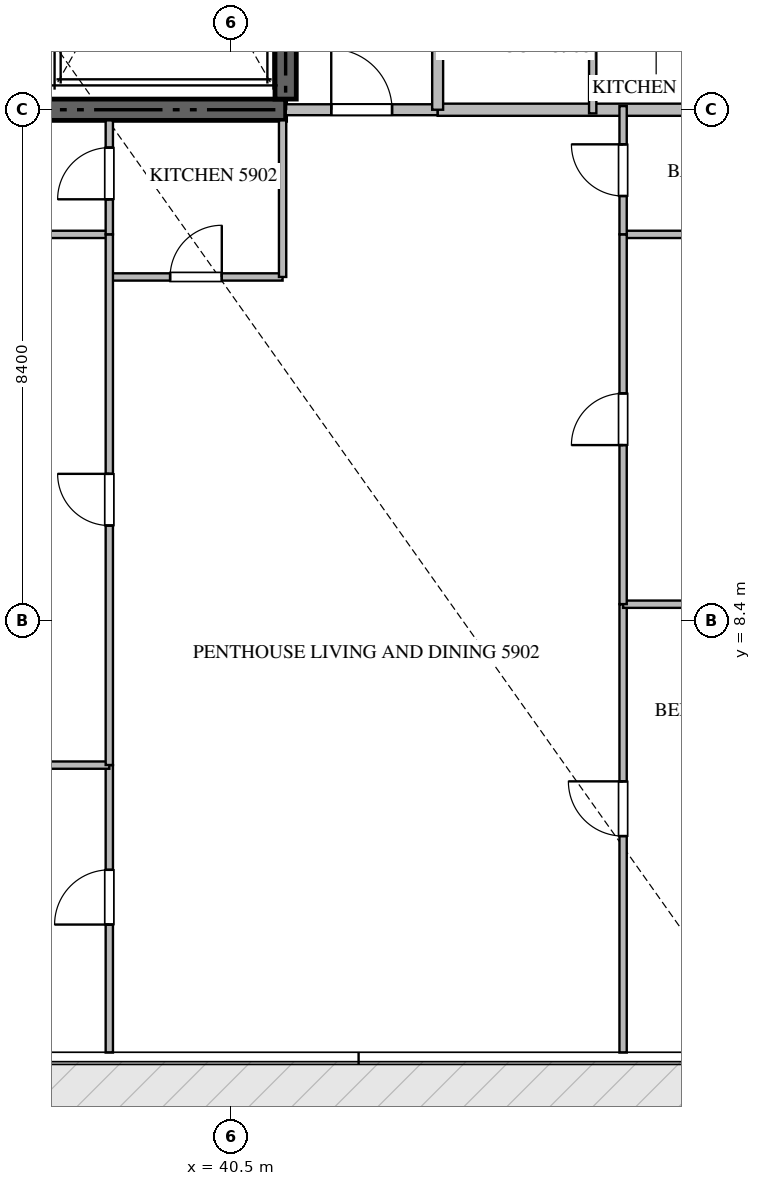
"""IFC4 building model, lengths in metres.
Left out: names, types, materials, properties, quantities, classifications, styles, units other than length and angle.
Written with IfcOpenShell. Run it as: python <this file> out.ifc"""

import sys

from ifc_helpers import new_model, si_unit, direction, frame, frame_2d, origin, place, context, subcontext, project, spatial, rectangle, extrude, source, transform, mapped, element, fill, save


model = new_model("IFC4")
c1 = context("Model", 3, precision=1e-05, world=origin(), true_north=direction((0.0, 1.0)))
c2 = subcontext(c1, "Body", "Model", "MODEL_VIEW")
j1 = project(units=[si_unit("LENGTHUNIT", "METRE"), si_unit("PLANEANGLEUNIT", "RADIAN")], contexts=[c1])
p1 = place(None, origin())
s1 = spatial("IfcSite", under=j1, at=p1, CompositionType="ELEMENT")
p2 = place(p1, origin())
s2 = spatial("IfcBuilding", under=s1, at=p2, CompositionType="ELEMENT")
p3 = place(p2, frame((0.0, 0.0, 237.4)))
s3 = spatial("IfcBuildingStorey", under=s2, at=p3, CompositionType="ELEMENT", Elevation=237.4)
p4 = place(p3, frame((23.4, 16.8, -0.26), z_axis=(0.0, 0.0, 1.0), x_axis=(1.0, 0.0, 0.0)))
e1 = element("IfcWall", 1, at=p4, inside=s3, PredefinedType="SHEAR", context=c2, shape_type="SweptSolid", body=[
    extrude(rectangle(XDim=18.0, YDim=0.35, at=frame_2d((9.0, 0.0))), origin(), (0.0, 0.0, 1.0), 3.848),
])
p5 = place(p3, frame((41.4, 16.975, -0.26), z_axis=(0.0, 0.0, 1.0), x_axis=(0.0, 1.0, 0.0)))
e2 = element("IfcWall", 2, at=p5, inside=s3, PredefinedType="SHEAR", context=c2, shape_type="SweptSolid", body=[
    extrude(rectangle(XDim=8.375, YDim=0.35, at=frame_2d((4.188, 0.0))), origin(), (0.0, 0.0, 1.0), 3.848),
])
p6 = place(p3, frame((43.9, 16.8, 0.0), z_axis=(0.0, 0.0, 1.0), x_axis=(1.0, 0.0, 0.0)))
e3 = element("IfcWall", 3, at=p6, inside=s3, PredefinedType="PARTITIONING", context=c2, shape_type="SweptSolid", body=[
    extrude(rectangle(XDim=13.418, YDim=0.2, at=frame_2d((6.709, 0.0))), origin(), (0.0, 0.0, 1.0), 3.59),
])
p7 = place(p3, frame((41.402, 16.8, 0.0), z_axis=(0.0, 0.0, 1.0), x_axis=(1.0, 0.0, 0.0)))
e4 = element("IfcWall", 4, at=p7, inside=s3, PredefinedType="PARTITIONING", context=c2, shape_type="SweptSolid", body=[
    extrude(rectangle(XDim=2.496, YDim=0.18, at=frame_2d((1.248, 0.0))), origin(), (0.0, 0.0, 1.0), 3.59),
])
p8 = place(p7, frame((0.748, 0.0, 0.0)))
e5 = element("IfcOpeningElement", 5, at=p8, cuts=e4, PredefinedType="OPENING", context=c2, shape_type="SweptSolid", body=[
    extrude(rectangle(XDim=1.0, YDim=2.15, at=frame_2d((0.5, 1.075))), frame((0.0, 0.1, 0.0), z_axis=(0.0, -1.0, 0.0), x_axis=(1.0, 0.0, 0.0)), (0.0, 0.0, 1.0), 0.2),
])
p9 = place(p3, frame((43.9, 16.8, 0.0), z_axis=(0.0, 0.0, 1.0), x_axis=(0.0, 1.0, 0.0)))
e6 = element("IfcWall", 6, at=p9, inside=s3, PredefinedType="PARTITIONING", context=c2, shape_type="SweptSolid", body=[
    extrude(rectangle(XDim=16.8, YDim=0.18, at=frame_2d((8.4, 0.0))), origin(), (0.0, 0.0, 1.0), 3.59),
])
p10 = place(p9, frame((4.693, 0.0, 0.0)))
e7 = element("IfcOpeningElement", 7, at=p10, cuts=e6, PredefinedType="OPENING", context=c2, shape_type="SweptSolid", body=[
    extrude(rectangle(XDim=1.0, YDim=2.15, at=frame_2d((0.5, 1.075))), frame((0.0, 0.1, 0.0), z_axis=(0.0, -1.0, 0.0), x_axis=(1.0, 0.0, 0.0)), (0.0, 0.0, 1.0), 0.2),
])
p11 = place(p9, frame((13.13, 0.0, 0.0)))
e8 = element("IfcOpeningElement", 8, at=p11, cuts=e6, PredefinedType="OPENING", context=c2, shape_type="SweptSolid", body=[
    extrude(rectangle(XDim=1.0, YDim=2.15, at=frame_2d((0.5, 1.075))), frame((0.0, 0.1, 0.0), z_axis=(0.0, -1.0, 0.0), x_axis=(1.0, 0.0, 0.0)), (0.0, 0.0, 1.0), 0.2),
])
p12 = place(p3, frame((38.5, 14.05, 0.0), z_axis=(0.0, 0.0, 1.0), x_axis=(1.0, 0.0, 0.0)))
e9 = element("IfcWall", 9, at=p12, inside=s3, PredefinedType="PARTITIONING", context=c2, shape_type="SweptSolid", body=[
    extrude(rectangle(XDim=2.85, YDim=0.12, at=frame_2d((1.425, 0.0))), origin(), (0.0, 0.0, 1.0), 3.59),
])
p13 = place(p12, frame((1.0, 0.0, 0.0)))
e10 = element("IfcOpeningElement", 10, at=p13, cuts=e9, PredefinedType="OPENING", context=c2, shape_type="SweptSolid", body=[
    extrude(rectangle(XDim=0.85, YDim=2.1, at=frame_2d((0.425, 1.05))), frame((0.0, 0.07, 0.0), z_axis=(0.0, -1.0, 0.0), x_axis=(1.0, 0.0, 0.0)), (0.0, 0.0, 1.0), 0.14),
])
p14 = place(p3, frame((41.35, 14.05, 0.0), z_axis=(0.0, 0.0, 1.0), x_axis=(0.0, 1.0, 0.0)))
e11 = element("IfcWall", 11, at=p14, inside=s3, PredefinedType="PARTITIONING", context=c2, shape_type="SweptSolid", body=[
    extrude(rectangle(XDim=2.575, YDim=0.12, at=frame_2d((1.288, 0.0))), origin(), (0.0, 0.0, 1.0), 3.59),
])
p15 = place(p3, frame((38.5, 1.295, 0.0), z_axis=(0.0, 0.0, 1.0), x_axis=(0.0, 1.0, 0.0)))
e12 = element("IfcWall", 12, at=p15, inside=s3, PredefinedType="PARTITIONING", context=c2, shape_type="SweptSolid", body=[
    extrude(rectangle(XDim=4.727, YDim=0.12, at=frame_2d((2.364, 0.0))), origin(), (0.0, 0.0, 1.0), 3.59),
])
p16 = place(p15, frame((2.105, 0.0, 0.0)))
e13 = element("IfcOpeningElement", 13, at=p16, cuts=e12, PredefinedType="OPENING", context=c2, shape_type="SweptSolid", body=[
    extrude(rectangle(XDim=0.9, YDim=2.1, at=frame_2d((0.45, 1.05))), frame((0.0, 0.07, 0.0), z_axis=(0.0, -1.0, 0.0), x_axis=(1.0, 0.0, 0.0)), (0.0, 0.0, 1.0), 0.14),
])
for number, where, z_axis, x_axis in (
    (14, (29.44, 6.022, 0.0), (0.0, 0.0, 1.0), (1.0, 0.0, 0.0)),
    (15, (29.44, 14.75, 0.0), (0.0, 0.0, 1.0), (1.0, 0.0, 0.0)),
):
    element("IfcWall", number, at=place(p3, frame(where, z_axis=z_axis, x_axis=x_axis)), inside=s3, PredefinedType="PARTITIONING", context=c2, shape_type="SweptSolid", body=[
        extrude(rectangle(XDim=9.06, YDim=0.12, at=frame_2d((4.53, 0.0))), origin(), (0.0, 0.0, 1.0), 3.59),
    ])
p17 = place(p3, frame((38.5, 6.024, 0.0), z_axis=(0.0, 0.0, 1.0), x_axis=(0.0, 1.0, 0.0)))
e16 = element("IfcWall", 16, at=p17, inside=s3, PredefinedType="PARTITIONING", context=c2, shape_type="SweptSolid", body=[
    extrude(rectangle(XDim=8.726, YDim=0.12, at=frame_2d((4.363, 0.0))), origin(), (0.0, 0.0, 1.0), 3.59),
])
p18 = place(p17, frame((3.938, 0.0, 0.0)))
e17 = element("IfcOpeningElement", 17, at=p18, cuts=e16, PredefinedType="OPENING", context=c2, shape_type="SweptSolid", body=[
    extrude(rectangle(XDim=0.85, YDim=2.1, at=frame_2d((0.425, 1.05))), frame((0.0, 0.07, 0.0), z_axis=(0.0, -1.0, 0.0), x_axis=(1.0, 0.0, 0.0)), (0.0, 0.0, 1.0), 0.14),
])
p19 = place(p3, frame((38.5, 14.752, 0.0), z_axis=(0.0, 0.0, 1.0), x_axis=(0.0, 1.0, 0.0)))
e18 = element("IfcWall", 18, at=p19, inside=s3, PredefinedType="PARTITIONING", context=c2, shape_type="SweptSolid", body=[
    extrude(rectangle(XDim=1.873, YDim=0.12, at=frame_2d((0.937, 0.0))), origin(), (0.0, 0.0, 1.0), 3.59),
])
p20 = place(p19, frame((0.575, 0.0, 0.0)))
e19 = element("IfcOpeningElement", 19, at=p20, cuts=e18, PredefinedType="OPENING", context=c2, shape_type="SweptSolid", body=[
    extrude(rectangle(XDim=0.85, YDim=2.1, at=frame_2d((0.425, 1.05))), frame((0.0, 0.07, 0.0), z_axis=(0.0, -1.0, 0.0), x_axis=(1.0, 0.0, 0.0)), (0.0, 0.0, 1.0), 0.14),
])
p21 = place(p3, frame((46.95, 1.295, 0.0), z_axis=(0.0, 0.0, 1.0), x_axis=(0.0, 1.0, 0.0)))
e20 = element("IfcWall", 20, at=p21, inside=s3, PredefinedType="PARTITIONING", context=c2, shape_type="SweptSolid", body=[
    extrude(rectangle(XDim=7.373, YDim=0.12, at=frame_2d((3.687, 0.0))), origin(), (0.0, 0.0, 1.0), 3.59),
])
p22 = place(p21, frame((3.56, 0.0, 0.0)))
e21 = element("IfcOpeningElement", 21, at=p22, cuts=e20, PredefinedType="OPENING", context=c2, shape_type="SweptSolid", body=[
    extrude(rectangle(XDim=0.9, YDim=2.1, at=frame_2d((0.45, 1.05))), frame((0.0, 0.07, 0.0), z_axis=(0.0, -1.0, 0.0), x_axis=(1.0, 0.0, 0.0)), (0.0, 0.0, 1.0), 0.14),
])
p23 = place(p3, frame((46.95, 8.668, 0.0), z_axis=(0.0, 0.0, 1.0), x_axis=(1.0, 0.0, 0.0)))
e22 = element("IfcWall", 22, at=p23, inside=s3, PredefinedType="PARTITIONING", context=c2, shape_type="SweptSolid", body=[
    extrude(rectangle(XDim=6.355, YDim=0.12, at=frame_2d((3.177, 0.0))), origin(), (0.0, 0.0, 1.0), 3.59),
])
p24 = place(p3, frame((46.95, 14.75, 0.0), z_axis=(0.0, 0.0, 1.0), x_axis=(1.0, 0.0, 0.0)))
e23 = element("IfcWall", 23, at=p24, inside=s3, PredefinedType="PARTITIONING", context=c2, shape_type="SweptSolid", body=[
    extrude(rectangle(XDim=3.2, YDim=0.12, at=frame_2d((1.6, 0.0))), origin(), (0.0, 0.0, 1.0), 3.59),
])
p25 = place(p3, frame((46.95, 8.67, 0.0), z_axis=(0.0, 0.0, 1.0), x_axis=(0.0, 1.0, 0.0)))
e24 = element("IfcWall", 24, at=p25, inside=s3, PredefinedType="PARTITIONING", context=c2, shape_type="SweptSolid", body=[
    extrude(rectangle(XDim=6.08, YDim=0.12, at=frame_2d((3.04, 0.0))), origin(), (0.0, 0.0, 1.0), 3.59),
])
p26 = place(p25, frame((2.615, 0.0, 0.0)))
e25 = element("IfcOpeningElement", 25, at=p26, cuts=e24, PredefinedType="OPENING", context=c2, shape_type="SweptSolid", body=[
    extrude(rectangle(XDim=0.85, YDim=2.1, at=frame_2d((0.425, 1.05))), frame((0.0, 0.07, 0.0), z_axis=(0.0, -1.0, 0.0), x_axis=(1.0, 0.0, 0.0)), (0.0, 0.0, 1.0), 0.14),
])
p27 = place(p3, frame((46.95, 14.752, 0.0), z_axis=(0.0, 0.0, 1.0), x_axis=(0.0, 1.0, 0.0)))
e26 = element("IfcWall", 26, at=p27, inside=s3, PredefinedType="PARTITIONING", context=c2, shape_type="SweptSolid", body=[
    extrude(rectangle(XDim=2.108, YDim=0.12, at=frame_2d((1.054, 0.0))), origin(), (0.0, 0.0, 1.0), 3.59),
])
p28 = place(p27, frame((0.629, 0.0, 0.0)))
e27 = element("IfcOpeningElement", 27, at=p28, cuts=e26, PredefinedType="OPENING", context=c2, shape_type="SweptSolid", body=[
    extrude(rectangle(XDim=0.85, YDim=2.1, at=frame_2d((0.425, 1.05))), frame((0.0, 0.07, 0.0), z_axis=(0.0, -1.0, 0.0), x_axis=(1.0, 0.0, 0.0)), (0.0, 0.0, 1.0), 0.14),
])
p29 = place(p3, frame((46.45, 16.74, 0.0), z_axis=(0.0, 0.0, 1.0), x_axis=(0.0, 1.0, 0.0)))
e28 = element("IfcWall", 28, at=p29, inside=s3, PredefinedType="PARTITIONING", context=c2, shape_type="SweptSolid", body=[
    extrude(rectangle(XDim=2.66, YDim=0.12, at=frame_2d((1.33, 0.0))), origin(), (0.0, 0.0, 1.0), 3.59),
])
m1 = source(origin(), c2, "Body", "SweptSolid", [
    extrude(rectangle(XDim=1.0, YDim=2.15, at=frame_2d((0.5, 1.075))), frame((0.0, 0.025, 0.0), z_axis=(0.0, -1.0, 0.0), x_axis=(1.0, 0.0, 0.0)), (0.0, 0.0, 1.0), 0.05),
])
p30 = place(p8, origin())
e29 = element("IfcDoor", 29, at=p30, inside=s3, OperationType="SINGLE_SWING_LEFT", PredefinedType="DOOR", context=c2, shape_type="MappedRepresentation", body=[
    mapped(m1, transform((0.0, 0.0, 0.0), scale=1.0)),
])
fill(e5, e29)
m2 = source(origin(), c2, "Body", "SweptSolid", [
    extrude(rectangle(XDim=0.85, YDim=2.1, at=frame_2d((0.425, 1.05))), frame((0.0, 0.025, 0.0), z_axis=(0.0, -1.0, 0.0), x_axis=(1.0, 0.0, 0.0)), (0.0, 0.0, 1.0), 0.05),
])
p31 = place(p13, origin())
e30 = element("IfcDoor", 30, at=p31, inside=s3, OperationType="SINGLE_SWING_RIGHT", PredefinedType="DOOR", context=c2, shape_type="MappedRepresentation", body=[
    mapped(m2, transform((0.0, 0.0, 0.0), scale=1.0)),
])
fill(e10, e30)
m3 = source(origin(), c2, "Body", "SweptSolid", [
    extrude(rectangle(XDim=0.9, YDim=2.1, at=frame_2d((0.45, 1.05))), frame((0.0, 0.025, 0.0), z_axis=(0.0, -1.0, 0.0), x_axis=(1.0, 0.0, 0.0)), (0.0, 0.0, 1.0), 0.05),
])
p32 = place(p16, origin())
e31 = element("IfcDoor", 31, at=p32, inside=s3, OperationType="SINGLE_SWING_LEFT", PredefinedType="DOOR", context=c2, shape_type="MappedRepresentation", body=[
    mapped(m3, transform((0.0, 0.0, 0.0), scale=1.0)),
])
fill(e13, e31)
p33 = place(p18, origin())
e32 = element("IfcDoor", 32, at=p33, inside=s3, OperationType="SINGLE_SWING_RIGHT", PredefinedType="DOOR", context=c2, shape_type="MappedRepresentation", body=[
    mapped(m2, transform((0.0, 0.0, 0.0), scale=1.0)),
])
fill(e17, e32)
p34 = place(p20, origin())
e33 = element("IfcDoor", 33, at=p34, inside=s3, OperationType="SINGLE_SWING_LEFT", PredefinedType="DOOR", context=c2, shape_type="MappedRepresentation", body=[
    mapped(m2, transform((0.0, 0.0, 0.0), scale=1.0)),
])
fill(e19, e33)
p35 = place(p22, origin())
e34 = element("IfcDoor", 34, at=p35, inside=s3, OperationType="SINGLE_SWING_RIGHT", PredefinedType="DOOR", context=c2, shape_type="MappedRepresentation", body=[
    mapped(m3, transform((0.0, 0.0, 0.0), scale=1.0)),
])
fill(e21, e34)
p36 = place(p26, origin())
e35 = element("IfcDoor", 35, at=p36, inside=s3, OperationType="SINGLE_SWING_LEFT", PredefinedType="DOOR", context=c2, shape_type="MappedRepresentation", body=[
    mapped(m2, transform((0.0, 0.0, 0.0), scale=1.0)),
])
fill(e25, e35)
p37 = place(p28, origin())
e36 = element("IfcDoor", 36, at=p37, inside=s3, OperationType="SINGLE_SWING_RIGHT", PredefinedType="DOOR", context=c2, shape_type="MappedRepresentation", body=[
    mapped(m2, transform((0.0, 0.0, 0.0), scale=1.0)),
])
fill(e27, e36)
save(model, sys.argv[1])
